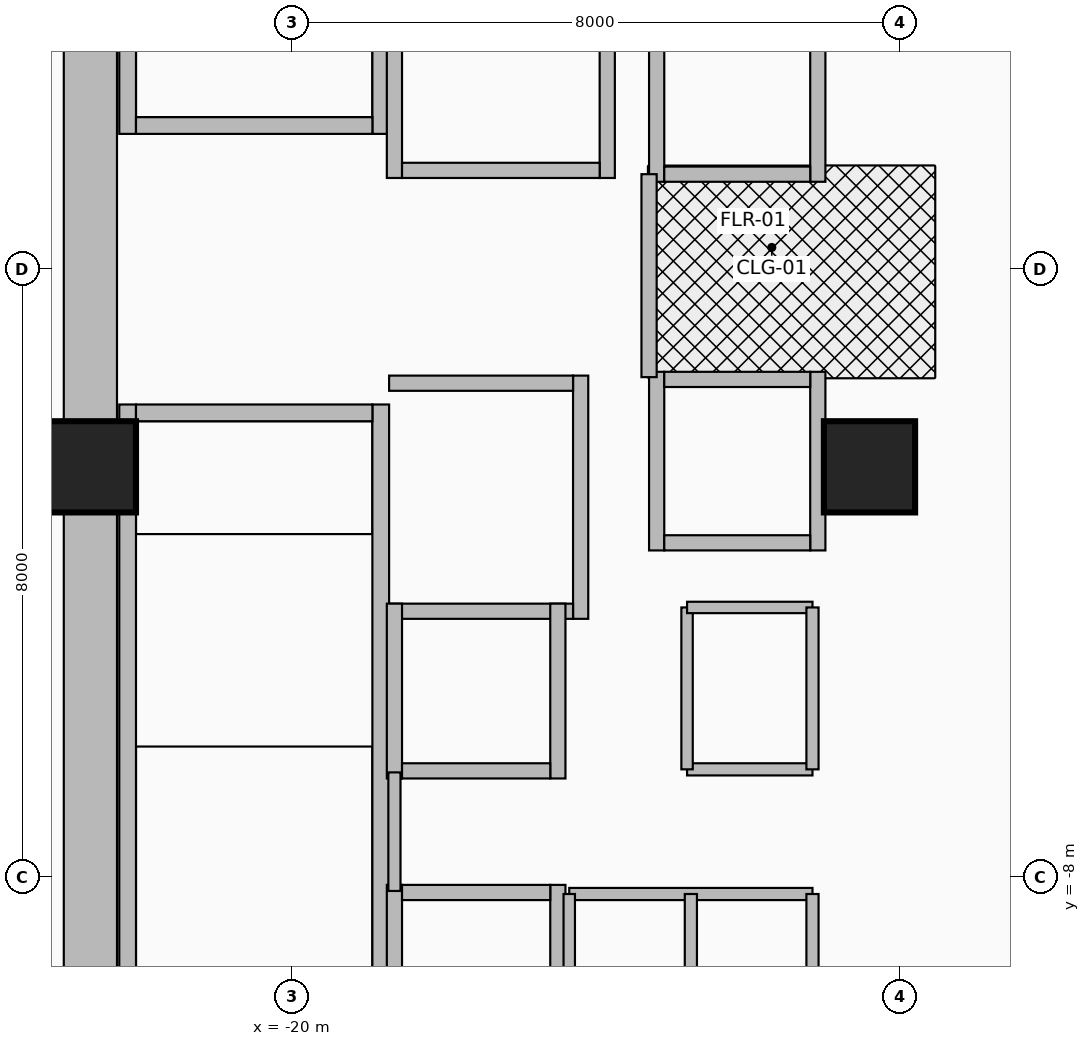
"""IFC4 building model, lengths in metres.
Left out: names, types, materials, properties, quantities, classifications, styles, units other than length and angle.
Written with IfcOpenShell. Run it as: python <this file> out.ifc"""

import sys

from ifc_helpers import new_model, si_unit, direction, frame, frame_2d, origin, origin_2d, place, context, subcontext, project, spatial, rectangle, extrude, source, transform, mapped, element, fill, save


model = new_model("IFC4")
c1 = context("Model", 3, precision=1e-05, world=origin(), true_north=direction((0.0, 1.0)))
c2 = subcontext(c1, "Body", "Model", "MODEL_VIEW")
j1 = project(units=[si_unit("LENGTHUNIT", "METRE"), si_unit("PLANEANGLEUNIT", "RADIAN")], contexts=[c1])
p1 = place(None, origin())
s1 = spatial("IfcSite", under=j1, at=p1, CompositionType="ELEMENT")
p2 = place(p1, origin())
s2 = spatial("IfcBuilding", under=s1, at=p2, CompositionType="ELEMENT")
p3 = place(p2, frame((0.0, 0.0, 109.4)))
s3 = spatial("IfcBuildingStorey", under=s2, at=p3, CompositionType="ELEMENT", Elevation=109.4)
for number, where, z_axis, x_axis in (
    (1, (-22.16, 1.78, 0.0), (0.0, 0.0, 1.0), (0.0, 1.0, 0.0)),
    (2, (-18.83, 1.78, 0.0), (0.0, 0.0, 1.0), (0.0, 1.0, 0.0)),
):
    element("IfcWall", number, at=place(p3, frame(where, z_axis=z_axis, x_axis=x_axis)), inside=s3, PredefinedType="SHEAR", context=c2, shape_type="SweptSolid", body=[
        extrude(rectangle(XDim=8.67, YDim=0.22, at=frame_2d((4.335, 0.0))), origin(), (0.0, 0.0, 1.0), 3.46),
    ])
p4 = place(p3, frame((-22.05, 1.89, 0.0), z_axis=(0.0, 0.0, 1.0), x_axis=(1.0, 0.0, 0.0)))
e3 = element("IfcWall", 3, at=p4, inside=s3, PredefinedType="SHEAR", context=c2, shape_type="SweptSolid", body=[
    extrude(rectangle(XDim=3.11, YDim=0.22, at=frame_2d((1.555, 0.0))), origin(), (0.0, 0.0, 1.0), 3.46),
])
p5 = place(p4, frame((1.0, 0.0, 0.0)))
e4 = element("IfcOpeningElement", 4, at=p5, cuts=e3, PredefinedType="OPENING", context=c2, shape_type="SweptSolid", body=[
    extrude(rectangle(XDim=1.1, YDim=2.15, at=frame_2d((0.55, 1.075))), frame((0.0, 0.125, 0.0), z_axis=(0.0, -1.0, 0.0), x_axis=(1.0, 0.0, 0.0)), (0.0, 0.0, 1.0), 0.25),
])
for number, where, z_axis, x_axis in (
    (5, (-22.16, -10.45, 0.0), (0.0, 0.0, 1.0), (0.0, 1.0, 0.0)),
    (6, (-18.83, -10.45, 0.0), (0.0, 0.0, 1.0), (0.0, 1.0, 0.0)),
):
    element("IfcWall", number, at=place(p3, frame(where, z_axis=z_axis, x_axis=x_axis)), inside=s3, PredefinedType="SHEAR", context=c2, shape_type="SweptSolid", body=[
        extrude(rectangle(XDim=8.67, YDim=0.22, at=frame_2d((4.335, 0.0))), origin(), (0.0, 0.0, 1.0), 3.46),
    ])
p6 = place(p3, frame((-22.05, -1.89, 0.0), z_axis=(0.0, 0.0, 1.0), x_axis=(1.0, 0.0, 0.0)))
e7 = element("IfcWall", 7, at=p6, inside=s3, PredefinedType="SHEAR", context=c2, shape_type="SweptSolid", body=[
    extrude(rectangle(XDim=3.11, YDim=0.22, at=frame_2d((1.555, 0.0))), origin(), (0.0, 0.0, 1.0), 3.46),
])
p7 = place(p6, frame((1.0, 0.0, 0.0)))
e8 = element("IfcOpeningElement", 8, at=p7, cuts=e7, PredefinedType="OPENING", context=c2, shape_type="SweptSolid", body=[
    extrude(rectangle(XDim=1.1, YDim=2.15, at=frame_2d((0.55, 1.075))), frame((0.0, 0.125, 0.0), z_axis=(0.0, -1.0, 0.0), x_axis=(1.0, 0.0, 0.0)), (0.0, 0.0, 1.0), 0.25),
])
p8 = place(p3, frame((-22.65, -11.15, 0.0), z_axis=(0.0, 0.0, 1.0), x_axis=(0.0, 1.0, 0.0)))
e9 = element("IfcWall", 9, at=p8, inside=s3, PredefinedType="SHEAR", context=c2, shape_type="SweptSolid", body=[
    extrude(rectangle(XDim=22.3, YDim=0.7, at=frame_2d((11.15, 0.0))), origin(), (0.0, 0.0, 1.0), 3.46),
])
m1 = source(origin(), c2, "Body", "SweptSolid", [
    extrude(rectangle(XDim=1.2, YDim=1.2, at=origin_2d()), origin(), (0.0, 0.0, 1.0), 3.7),
])
for number, where, z_axis, x_axis in (
    (10, (-22.65, -2.6, 0.0), (0.0, 0.0, 1.0), (1.0, 0.0, 0.0)),
    (11, (-12.4, -2.6, 0.0), (0.0, 0.0, 1.0), (1.0, 0.0, 0.0)),
):
    element("IfcColumn", number, at=place(p3, frame(where, z_axis=z_axis, x_axis=x_axis)), inside=s3, PredefinedType="COLUMN", context=c2, shape_type="MappedRepresentation", body=[
        mapped(m1, transform((0.0, 0.0, 0.0), x_axis=(1.0, 0.0, 0.0), y_axis=(0.0, 1.0, 0.0), z_axis=(0.0, 0.0, 1.0), scale=1.0)),
    ])
for number, where, z_axis, x_axis in (
    (12, (-18.65, 1.2, 0.0), (0.0, 0.0, 1.0), (0.0, 1.0, 0.0)),
    (13, (-15.85, 1.2, 0.0), (0.0, 0.0, 1.0), (0.0, 1.0, 0.0)),
):
    element("IfcWall", number, at=place(p3, frame(where, z_axis=z_axis, x_axis=x_axis)), inside=s3, PredefinedType="MOVABLE", context=c2, shape_type="SweptSolid", body=[
        extrude(rectangle(XDim=3.225, YDim=0.2, at=frame_2d((1.613, 0.0))), origin(), (0.0, 0.0, 1.0), 3.46),
    ])
p9 = place(p3, frame((-18.55, 1.3, 0.0), z_axis=(0.0, 0.0, 1.0), x_axis=(1.0, 0.0, 0.0)))
e14 = element("IfcWall", 14, at=p9, inside=s3, PredefinedType="MOVABLE", context=c2, shape_type="SweptSolid", body=[
    extrude(rectangle(XDim=2.6, YDim=0.2, at=frame_2d((1.3, 0.0))), origin(), (0.0, 0.0, 1.0), 3.46),
])
p10 = place(p9, frame((0.7, 0.0, 0.0)))
e15 = element("IfcOpeningElement", 15, at=p10, cuts=e14, PredefinedType="OPENING", context=c2, shape_type="SweptSolid", body=[
    extrude(rectangle(XDim=1.2, YDim=2.1, at=frame_2d((0.6, 1.05))), frame((0.0, 0.115, 0.0), z_axis=(0.0, -1.0, 0.0), x_axis=(1.0, 0.0, 0.0)), (0.0, 0.0, 1.0), 0.23),
])
p11 = place(p3, frame((-16.2, -4.6, 0.0), z_axis=(0.0, 0.0, 1.0), x_axis=(0.0, 1.0, 0.0)))
e16 = element("IfcWall", 16, at=p11, inside=s3, PredefinedType="MOVABLE", context=c2, shape_type="SweptSolid", body=[
    extrude(rectangle(XDim=3.2, YDim=0.2, at=frame_2d((1.6, 0.0))), origin(), (0.0, 0.0, 1.0), 3.46),
])
p12 = place(p3, frame((-18.72, -4.5, 0.0), z_axis=(0.0, 0.0, 1.0), x_axis=(1.0, 0.0, 0.0)))
e17 = element("IfcWall", 17, at=p12, inside=s3, PredefinedType="MOVABLE", context=c2, shape_type="SweptSolid", body=[
    extrude(rectangle(XDim=2.42, YDim=0.2, at=frame_2d((1.21, 0.0))), origin(), (0.0, 0.0, 1.0), 3.46),
])
p13 = place(p3, frame((-18.72, -1.5, 0.0), z_axis=(0.0, 0.0, 1.0), x_axis=(1.0, 0.0, 0.0)))
e18 = element("IfcWall", 18, at=p13, inside=s3, PredefinedType="MOVABLE", context=c2, shape_type="SweptSolid", body=[
    extrude(rectangle(XDim=2.42, YDim=0.2, at=frame_2d((1.21, 0.0))), origin(), (0.0, 0.0, 1.0), 3.46),
])
p14 = place(p13, frame((0.61, 0.0, 0.0)))
e19 = element("IfcOpeningElement", 19, at=p14, cuts=e18, PredefinedType="OPENING", context=c2, shape_type="SweptSolid", body=[
    extrude(rectangle(XDim=1.2, YDim=2.1, at=frame_2d((0.6, 1.05))), frame((0.0, 0.115, 0.0), z_axis=(0.0, -1.0, 0.0), x_axis=(1.0, 0.0, 0.0)), (0.0, 0.0, 1.0), 0.23),
])
for number, where, z_axis, x_axis in (
    (20, (-18.65, -10.45, 0.0), (0.0, 0.0, 1.0), (0.0, 1.0, 0.0)),
    (21, (-16.5, -10.45, 0.0), (0.0, 0.0, 1.0), (0.0, 1.0, 0.0)),
):
    element("IfcWall", number, at=place(p3, frame(where, z_axis=z_axis, x_axis=x_axis)), inside=s3, PredefinedType="MOVABLE", context=c2, shape_type="SweptSolid", body=[
        extrude(rectangle(XDim=2.35, YDim=0.2, at=frame_2d((1.175, 0.0))), origin(), (0.0, 0.0, 1.0), 2.666),
    ])
p15 = place(p3, frame((-18.55, -8.2, 0.0), z_axis=(0.0, 0.0, 1.0), x_axis=(1.0, 0.0, 0.0)))
e22 = element("IfcWall", 22, at=p15, inside=s3, PredefinedType="MOVABLE", context=c2, shape_type="SweptSolid", body=[
    extrude(rectangle(XDim=1.95, YDim=0.2, at=frame_2d((0.975, 0.0))), origin(), (0.0, 0.0, 1.0), 3.46),
])
p16 = place(p15, frame((0.425, 0.0, 0.0)))
e23 = element("IfcOpeningElement", 23, at=p16, cuts=e22, PredefinedType="OPENING", context=c2, shape_type="SweptSolid", body=[
    extrude(rectangle(XDim=1.1, YDim=2.1, at=frame_2d((0.55, 1.05))), frame((0.0, 0.115, 0.0), z_axis=(0.0, -1.0, 0.0), x_axis=(1.0, 0.0, 0.0)), (0.0, 0.0, 1.0), 0.23),
])
p17 = place(p3, frame((-15.2, 1.15, 0.0), z_axis=(0.0, 0.0, 1.0), x_axis=(0.0, 1.0, 0.0)))
e24 = element("IfcWall", 24, at=p17, inside=s3, PredefinedType="MOVABLE", context=c2, shape_type="SweptSolid", body=[
    extrude(rectangle(XDim=2.25, YDim=0.2, at=frame_2d((1.125, 0.0))), origin(), (0.0, 0.0, 1.0), 3.46),
])
p18 = place(p3, frame((-13.08, 1.15, 0.0), z_axis=(0.0, 0.0, 1.0), x_axis=(0.0, 1.0, 0.0)))
e25 = element("IfcWall", 25, at=p18, inside=s3, PredefinedType="MOVABLE", context=c2, shape_type="SweptSolid", body=[
    extrude(rectangle(XDim=2.25, YDim=0.2, at=frame_2d((1.125, 0.0))), origin(), (0.0, 0.0, 1.0), 3.46),
])
p19 = place(p18, frame((0.575, 0.0, 0.0)))
e26 = element("IfcOpeningElement", 26, at=p19, cuts=e25, PredefinedType="OPENING", context=c2, shape_type="SweptSolid", body=[
    extrude(rectangle(XDim=1.1, YDim=2.1, at=frame_2d((0.55, 1.05))), frame((0.0, 0.115, 0.0), z_axis=(0.0, -1.0, 0.0), x_axis=(1.0, 0.0, 0.0)), (0.0, 0.0, 1.0), 0.23),
])
p20 = place(p3, frame((-15.1, 1.25, 0.0), z_axis=(0.0, 0.0, 1.0), x_axis=(1.0, 0.0, 0.0)))
e27 = element("IfcWall", 27, at=p20, inside=s3, PredefinedType="MOVABLE", context=c2, shape_type="SweptSolid", body=[
    extrude(rectangle(XDim=1.92, YDim=0.2, at=frame_2d((0.96, 0.0))), origin(), (0.0, 0.0, 1.0), 3.46),
])
for number, where, z_axis, x_axis in (
    (28, (-18.65, -6.7, 0.0), (0.0, 0.0, 1.0), (0.0, 1.0, 0.0)),
    (29, (-16.5, -6.7, 0.0), (0.0, 0.0, 1.0), (0.0, 1.0, 0.0)),
):
    element("IfcWall", number, at=place(p3, frame(where, z_axis=z_axis, x_axis=x_axis)), inside=s3, PredefinedType="MOVABLE", context=c2, shape_type="SweptSolid", body=[
        extrude(rectangle(XDim=2.3, YDim=0.2, at=frame_2d((1.15, 0.0))), origin(), (0.0, 0.0, 1.0), 3.46),
    ])
p21 = place(p3, frame((-18.55, -6.6, 0.0), z_axis=(0.0, 0.0, 1.0), x_axis=(1.0, 0.0, 0.0)))
e30 = element("IfcWall", 30, at=p21, inside=s3, PredefinedType="MOVABLE", context=c2, shape_type="SweptSolid", body=[
    extrude(rectangle(XDim=1.95, YDim=0.2, at=frame_2d((0.975, 0.0))), origin(), (0.0, 0.0, 1.0), 3.46),
])
for number, where, z_axis, x_axis in (
    (31, (-15.2, -3.7, 0.0), (0.0, 0.0, 1.0), (0.0, 1.0, 0.0)),
    (32, (-13.08, -3.7, 0.0), (0.0, 0.0, 1.0), (0.0, 1.0, 0.0)),
):
    element("IfcWall", number, at=place(p3, frame(where, z_axis=z_axis, x_axis=x_axis)), inside=s3, PredefinedType="MOVABLE", context=c2, shape_type="SweptSolid", body=[
        extrude(rectangle(XDim=2.35, YDim=0.2, at=frame_2d((1.175, 0.0))), origin(), (0.0, 0.0, 1.0), 3.46),
    ])
for number, where, z_axis, x_axis in (
    (33, (-15.1, -3.6, 0.0), (0.0, 0.0, 1.0), (1.0, 0.0, 0.0)),
    (34, (-15.1, -1.45, 0.0), (0.0, 0.0, 1.0), (1.0, 0.0, 0.0)),
):
    element("IfcWall", number, at=place(p3, frame(where, z_axis=z_axis, x_axis=x_axis)), inside=s3, PredefinedType="MOVABLE", context=c2, shape_type="SweptSolid", body=[
        extrude(rectangle(XDim=1.92, YDim=0.2, at=frame_2d((0.96, 0.0))), origin(), (0.0, 0.0, 1.0), 3.46),
    ])
p22 = place(p3, frame((-15.3, -1.42, 0.0), z_axis=(0.0, 0.0, 1.0), x_axis=(0.0, 1.0, 0.0)))
e35 = element("IfcWall", 35, at=p22, inside=s3, PredefinedType="PARTITIONING", context=c2, shape_type="SweptSolid", body=[
    extrude(rectangle(XDim=2.67, YDim=0.2, at=frame_2d((1.335, 0.0))), origin(), (0.0, 0.0, 1.0), 3.46),
])
p23 = place(p22, frame((0.78, 0.0, 0.0)))
e36 = element("IfcOpeningElement", 36, at=p23, cuts=e35, PredefinedType="OPENING", context=c2, shape_type="SweptSolid", body=[
    extrude(rectangle(XDim=1.05, YDim=2.15, at=frame_2d((0.525, 1.075))), frame((0.0, 0.115, 0.0), z_axis=(0.0, -1.0, 0.0), x_axis=(1.0, 0.0, 0.0)), (0.0, 0.0, 1.0), 0.23),
])
p24 = place(p3, frame((-18.65, -8.18, 0.0), z_axis=(0.0, 0.0, 1.0), x_axis=(0.0, 1.0, 0.0)))
e37 = element("IfcWall", 37, at=p24, inside=s3, PredefinedType="PARTITIONING", context=c2, shape_type="SweptSolid", body=[
    extrude(rectangle(XDim=1.56, YDim=0.16, at=frame_2d((0.78, 0.0))), origin(), (0.0, 0.0, 1.0), 3.46),
])
p25 = place(p3, frame((-16.35, -8.22, 0.0), z_axis=(0.0, 0.0, 1.0), x_axis=(1.0, 0.0, 0.0)))
e38 = element("IfcWall", 38, at=p25, inside=s3, PredefinedType="PARTITIONING", context=c2, shape_type="SweptSolid", body=[
    extrude(rectangle(XDim=3.2, YDim=0.16, at=frame_2d((1.6, 0.0))), origin(), (0.0, 0.0, 1.0), 3.46),
])
p26 = place(p25, frame((0.35, 0.0, 0.0)))
e39 = element("IfcOpeningElement", 39, at=p26, cuts=e38, PredefinedType="OPENING", context=c2, shape_type="SweptSolid", body=[
    extrude(rectangle(XDim=0.85, YDim=2.05, at=frame_2d((0.425, 1.025))), frame((0.0, 0.095, 0.0), z_axis=(0.0, -1.0, 0.0), x_axis=(1.0, 0.0, 0.0)), (0.0, 0.0, 1.0), 0.19),
])
p27 = place(p25, frame((1.95, 0.0, 0.0)))
e40 = element("IfcOpeningElement", 40, at=p27, cuts=e38, PredefinedType="OPENING", context=c2, shape_type="SweptSolid", body=[
    extrude(rectangle(XDim=0.85, YDim=2.05, at=frame_2d((0.425, 1.025))), frame((0.0, 0.095, 0.0), z_axis=(0.0, -1.0, 0.0), x_axis=(1.0, 0.0, 0.0)), (0.0, 0.0, 1.0), 0.19),
])
p28 = place(p3, frame((-16.35, -10.35, 0.0), z_axis=(0.0, 0.0, 1.0), x_axis=(0.0, 1.0, 0.0)))
e41 = element("IfcWall", 41, at=p28, inside=s3, PredefinedType="PARTITIONING", context=c2, shape_type="SweptSolid", body=[
    extrude(rectangle(XDim=2.13, YDim=0.15, at=frame_2d((1.065, 0.0))), origin(), (0.0, 0.0, 1.0), 3.46),
])
for number, where, z_axis, x_axis in (
    (42, (-13.15, -10.35, 0.0), (0.0, 0.0, 1.0), (0.0, 1.0, 0.0)),
    (43, (-14.75, -10.35, 0.0), (0.0, 0.0, 1.0), (0.0, 1.0, 0.0)),
):
    element("IfcWall", number, at=place(p3, frame(where, z_axis=z_axis, x_axis=x_axis)), inside=s3, PredefinedType="PARTITIONING", context=c2, shape_type="SweptSolid", body=[
        extrude(rectangle(XDim=2.13, YDim=0.16, at=frame_2d((1.065, 0.0))), origin(), (0.0, 0.0, 1.0), 3.46),
    ])
p29 = place(p3, frame((-14.8, -6.58, 0.0), z_axis=(0.0, 0.0, 1.0), x_axis=(1.0, 0.0, 0.0)))
e44 = element("IfcWall", 44, at=p29, inside=s3, PredefinedType="PARTITIONING", context=c2, shape_type="SweptSolid", body=[
    extrude(rectangle(XDim=1.65, YDim=0.16, at=frame_2d((0.825, 0.0))), origin(), (0.0, 0.0, 1.0), 3.46),
])
p30 = place(p29, frame((0.5, 0.0, 0.0)))
e45 = element("IfcOpeningElement", 45, at=p30, cuts=e44, PredefinedType="OPENING", context=c2, shape_type="SweptSolid", body=[
    extrude(rectangle(XDim=0.85, YDim=2.05, at=frame_2d((0.425, 1.025))), frame((0.0, 0.095, 0.0), z_axis=(0.0, -1.0, 0.0), x_axis=(1.0, 0.0, 0.0)), (0.0, 0.0, 1.0), 0.19),
])
p31 = place(p3, frame((-14.8, -6.58, 0.0), z_axis=(0.0, 0.0, 1.0), x_axis=(0.0, 1.0, 0.0)))
e46 = element("IfcWall", 46, at=p31, inside=s3, PredefinedType="PARTITIONING", context=c2, shape_type="SweptSolid", body=[
    extrude(rectangle(XDim=2.13, YDim=0.15, at=frame_2d((1.065, 0.0))), origin(), (0.0, 0.0, 1.0), 3.46),
])
p32 = place(p3, frame((-14.8, -4.45, 0.0), z_axis=(0.0, 0.0, 1.0), x_axis=(1.0, 0.0, 0.0)))
e47 = element("IfcWall", 47, at=p32, inside=s3, PredefinedType="PARTITIONING", context=c2, shape_type="SweptSolid", body=[
    extrude(rectangle(XDim=1.65, YDim=0.15, at=frame_2d((0.825, 0.0))), origin(), (0.0, 0.0, 1.0), 3.46),
])
p33 = place(p3, frame((-13.15, -6.58, 0.0), z_axis=(0.0, 0.0, 1.0), x_axis=(0.0, 1.0, 0.0)))
e48 = element("IfcWall", 48, at=p33, inside=s3, PredefinedType="PARTITIONING", context=c2, shape_type="SweptSolid", body=[
    extrude(rectangle(XDim=2.13, YDim=0.16, at=frame_2d((1.065, 0.0))), origin(), (0.0, 0.0, 1.0), 3.46),
])
p34 = place(p10, origin())
e49 = element("IfcDoor", 49, at=p34, inside=s3, OperationType="DOUBLE_DOOR_SLIDING", PredefinedType="DOOR", context=c2, shape_type="SweptSolid", body=[
    extrude(rectangle(XDim=1.2, YDim=2.1, at=frame_2d((0.6, 1.05))), frame((0.0, 0.025, 0.0), z_axis=(0.0, -1.0, 0.0), x_axis=(1.0, 0.0, 0.0)), (0.0, 0.0, 1.0), 0.05),
])
fill(e15, e49)
p35 = place(p14, origin())
e50 = element("IfcDoor", 50, at=p35, inside=s3, OperationType="DOUBLE_DOOR_SLIDING", PredefinedType="DOOR", context=c2, shape_type="SweptSolid", body=[
    extrude(rectangle(XDim=1.2, YDim=2.1, at=frame_2d((0.6, 1.05))), frame((0.0, 0.025, 0.0), z_axis=(0.0, -1.0, 0.0), x_axis=(1.0, 0.0, 0.0)), (0.0, 0.0, 1.0), 0.05),
])
fill(e19, e50)
p36 = place(p16, origin())
e51 = element("IfcDoor", 51, at=p36, inside=s3, OperationType="DOUBLE_DOOR_SLIDING", PredefinedType="DOOR", context=c2, shape_type="SweptSolid", body=[
    extrude(rectangle(XDim=1.1, YDim=2.1, at=frame_2d((0.55, 1.05))), frame((0.0, 0.025, 0.0), z_axis=(0.0, -1.0, 0.0), x_axis=(1.0, 0.0, 0.0)), (0.0, 0.0, 1.0), 0.05),
])
fill(e23, e51)
p37 = place(p19, origin())
e52 = element("IfcDoor", 52, at=p37, inside=s3, OperationType="DOUBLE_DOOR_SLIDING", PredefinedType="DOOR", context=c2, shape_type="SweptSolid", body=[
    extrude(rectangle(XDim=1.1, YDim=2.1, at=frame_2d((0.55, 1.05))), frame((0.0, 0.025, 0.0), z_axis=(0.0, -1.0, 0.0), x_axis=(1.0, 0.0, 0.0)), (0.0, 0.0, 1.0), 0.05),
])
fill(e26, e52)
p38 = place(p23, origin())
e53 = element("IfcDoor", 53, at=p38, inside=s3, OperationType="SINGLE_SWING_RIGHT", PredefinedType="DOOR", context=c2, shape_type="SweptSolid", body=[
    extrude(rectangle(XDim=1.05, YDim=2.15, at=frame_2d((0.525, 1.075))), frame((0.0, 0.025, 0.0), z_axis=(0.0, -1.0, 0.0), x_axis=(1.0, 0.0, 0.0)), (0.0, 0.0, 1.0), 0.05),
])
fill(e36, e53)
p39 = place(p5, frame((1.1, 0.0, 0.0), z_axis=(0.0, 0.0, 1.0), x_axis=(-1.0, 0.0, 0.0)))
e54 = element("IfcDoor", 54, at=p39, inside=s3, OperationType="SINGLE_SWING_LEFT", PredefinedType="DOOR", context=c2, shape_type="SweptSolid", body=[
    extrude(rectangle(XDim=1.1, YDim=2.15, at=frame_2d((0.55, 1.075))), frame((0.0, 0.025, 0.0), z_axis=(0.0, -1.0, 0.0), x_axis=(1.0, 0.0, 0.0)), (0.0, 0.0, 1.0), 0.05),
])
fill(e4, e54)
p40 = place(p7, origin())
e55 = element("IfcDoor", 55, at=p40, inside=s3, OperationType="SINGLE_SWING_RIGHT", PredefinedType="DOOR", context=c2, shape_type="SweptSolid", body=[
    extrude(rectangle(XDim=1.1, YDim=2.15, at=frame_2d((0.55, 1.075))), frame((0.0, 0.025, 0.0), z_axis=(0.0, -1.0, 0.0), x_axis=(1.0, 0.0, 0.0)), (0.0, 0.0, 1.0), 0.05),
])
fill(e8, e55)
p41 = place(p26, origin())
e56 = element("IfcDoor", 56, at=p41, inside=s3, OperationType="SINGLE_SWING_LEFT", PredefinedType="DOOR", context=c2, shape_type="SweptSolid", body=[
    extrude(rectangle(XDim=0.85, YDim=2.05, at=frame_2d((0.425, 1.025))), frame((0.0, 0.025, 0.0), z_axis=(0.0, -1.0, 0.0), x_axis=(1.0, 0.0, 0.0)), (0.0, 0.0, 1.0), 0.05),
])
fill(e39, e56)
p42 = place(p27, origin())
e57 = element("IfcDoor", 57, at=p42, inside=s3, OperationType="SINGLE_SWING_RIGHT", PredefinedType="DOOR", context=c2, shape_type="SweptSolid", body=[
    extrude(rectangle(XDim=0.85, YDim=2.05, at=frame_2d((0.425, 1.025))), frame((0.0, 0.025, 0.0), z_axis=(0.0, -1.0, 0.0), x_axis=(1.0, 0.0, 0.0)), (0.0, 0.0, 1.0), 0.05),
])
fill(e40, e57)
p43 = place(p30, origin())
e58 = element("IfcDoor", 58, at=p43, inside=s3, OperationType="SINGLE_SWING_LEFT", PredefinedType="DOOR", context=c2, shape_type="SweptSolid", body=[
    extrude(rectangle(XDim=0.85, YDim=2.05, at=frame_2d((0.425, 1.025))), frame((0.0, 0.025, 0.0), z_axis=(0.0, -1.0, 0.0), x_axis=(1.0, 0.0, 0.0)), (0.0, 0.0, 1.0), 0.05),
])
fill(e45, e58)
save(model, sys.argv[1])
